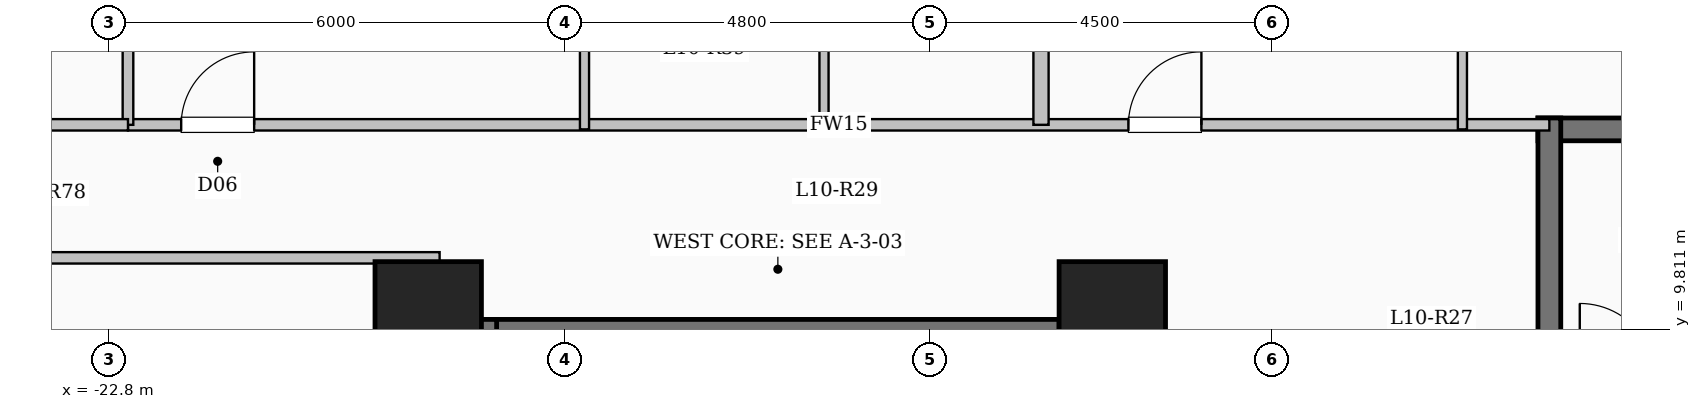
"""IFC4 building model, lengths in metres.
Left out: names, types, materials, properties, quantities, classifications, styles, units other than length and angle.
Written with IfcOpenShell. Run it as: python <this file> out.ifc"""

import sys

from ifc_helpers import new_model, si_unit, direction, frame, frame_2d, origin, origin_2d, place, context, subcontext, project, spatial, rectangle, extrude, element, fill, save


model = new_model("IFC4")
c1 = context("Model", 3, precision=1e-05, world=origin(), true_north=direction((0.0, 1.0)))
c2 = subcontext(c1, "Body", "Model", "MODEL_VIEW")
j1 = project(units=[si_unit("LENGTHUNIT", "METRE"), si_unit("PLANEANGLEUNIT", "RADIAN")], contexts=[c1])
p1 = place(None, origin())
s1 = spatial("IfcSite", under=j1, at=p1, CompositionType="ELEMENT")
p2 = place(p1, origin())
s2 = spatial("IfcBuilding", under=s1, at=p2, CompositionType="ELEMENT")
p3 = place(p2, frame((0.0, 0.0, 40.75)))
s3 = spatial("IfcBuildingStorey", under=s2, at=p3, CompositionType="ELEMENT", Elevation=40.75)
for number, where, z_axis, x_axis in (
    (1, (-9.6, 10.0, 0.0), (0.0, 0.0, 1.0), (1.0, 0.0, 0.0)),
    (2, (-18.6, 10.0, 0.0), (0.0, 0.0, 1.0), (1.0, 0.0, 0.0)),
):
    element("IfcColumn", number, at=place(p3, frame(where, z_axis=z_axis, x_axis=x_axis)), inside=s3, PredefinedType="COLUMN", context=c2, shape_type="SweptSolid", body=[
        extrude(rectangle(XDim=1.4, YDim=1.4, at=origin_2d()), origin(), (0.0, 0.0, 1.0), 3.35),
    ])
p4 = place(p3, frame((-18.0, 9.79, 0.0), z_axis=(0.0, 0.0, 1.0), x_axis=(1.0, 0.0, 0.0)))
e3 = element("IfcWall", 3, at=p4, inside=s3, PredefinedType="SHEAR", context=c2, shape_type="SweptSolid", body=[
    extrude(rectangle(XDim=8.0, YDim=0.3, at=frame_2d((4.0, 0.0))), origin(), (0.0, 0.0, 1.0), 3.35),
])
for number, where, z_axis, x_axis in (
    (4, (-17.85, 6.35, 0.0), (0.0, 0.0, 1.0), (0.0, 1.0, 0.0)),
    (5, (-10.15, 6.35, 0.0), (0.0, 0.0, 1.0), (0.0, 1.0, 0.0)),
):
    element("IfcWall", number, at=place(p3, frame(where, z_axis=z_axis, x_axis=x_axis)), inside=s3, PredefinedType="SHEAR", context=c2, shape_type="SweptSolid", body=[
        extrude(rectangle(XDim=3.59, YDim=0.3, at=frame_2d((1.795, 0.0))), origin(), (0.0, 0.0, 1.0), 3.35),
    ])
p5 = place(p3, frame((-4.0, 12.44, 0.0), z_axis=(0.0, 0.0, 1.0), x_axis=(1.0, 0.0, 0.0)))
e6 = element("IfcWall", 6, at=p5, inside=s3, PredefinedType="SHEAR", context=c2, shape_type="SweptSolid", body=[
    extrude(rectangle(XDim=8.0, YDim=0.3, at=frame_2d((4.0, 0.0))), origin(), (0.0, 0.0, 1.0), 3.35),
])
p6 = place(p3, frame((-3.85, 9.0, 0.0), z_axis=(0.0, 0.0, 1.0), x_axis=(0.0, 1.0, 0.0)))
e7 = element("IfcWall", 7, at=p6, inside=s3, PredefinedType="SHEAR", context=c2, shape_type="SweptSolid", body=[
    extrude(rectangle(XDim=3.59, YDim=0.3, at=frame_2d((1.795, 0.0))), origin(), (0.0, 0.0, 1.0), 3.35),
])
p7 = place(p3, frame((-22.55, 12.5, 0.0), z_axis=(0.0, 0.0, 1.0), x_axis=(1.0, 0.0, 0.0)))
e8 = element("IfcWall", 8, at=p7, inside=s3, PredefinedType="PARTITIONING", context=c2, shape_type="SweptSolid", body=[
    extrude(rectangle(XDim=18.7, YDim=0.15, at=frame_2d((9.35, 0.0))), origin(), (0.0, 0.0, 1.0), 3.1),
])
p8 = place(p7, frame((0.7, 0.0, 0.0)))
e9 = element("IfcOpeningElement", 9, at=p8, cuts=e8, PredefinedType="OPENING", context=c2, shape_type="SweptSolid", body=[
    extrude(rectangle(XDim=0.96, YDim=2.15, at=frame_2d((0.48, 1.075))), frame((0.0, 0.085, 0.0), z_axis=(0.0, -1.0, 0.0), x_axis=(1.0, 0.0, 0.0)), (0.0, 0.0, 1.0), 0.17),
])
p9 = place(p7, frame((13.162, 0.0, 0.0)))
e10 = element("IfcOpeningElement", 10, at=p9, cuts=e8, PredefinedType="OPENING", context=c2, shape_type="SweptSolid", body=[
    extrude(rectangle(XDim=0.96, YDim=2.15, at=frame_2d((0.48, 1.075))), frame((0.0, 0.085, 0.0), z_axis=(0.0, -1.0, 0.0), x_axis=(1.0, 0.0, 0.0)), (0.0, 0.0, 1.0), 0.17),
])
p10 = place(p3, frame((-10.538, 12.5, 0.0), z_axis=(0.0, 0.0, 1.0), x_axis=(0.0, 1.0, 0.0)))
e11 = element("IfcWall", 11, at=p10, inside=s3, PredefinedType="SOLIDWALL", context=c2, shape_type="SweptSolid", body=[
    extrude(rectangle(XDim=11.214, YDim=0.2, at=frame_2d((5.607, 0.0))), origin(), (0.0, 0.0, 1.0), 3.1),
])
p11 = place(p3, frame((-16.544, 12.44, 0.0), z_axis=(0.0, 0.0, 1.0), x_axis=(0.0, 1.0, 0.0)))
e12 = element("IfcWall", 12, at=p11, inside=s3, PredefinedType="PARTITIONING", context=c2, shape_type="SweptSolid", body=[
    extrude(rectangle(XDim=11.16, YDim=0.12, at=frame_2d((5.58, 0.0))), origin(), (0.0, 0.0, 1.0), 3.1),
])
p12 = place(p11, frame((2.905, 0.0, 0.0)))
e13 = element("IfcOpeningElement", 13, at=p12, cuts=e12, PredefinedType="OPENING", context=c2, shape_type="SweptSolid", body=[
    extrude(rectangle(XDim=1.08, YDim=2.15, at=frame_2d((0.54, 1.075))), frame((0.0, 0.07, 0.0), z_axis=(0.0, -1.0, 0.0), x_axis=(1.0, 0.0, 0.0)), (0.0, 0.0, 1.0), 0.14),
])
p13 = place(p3, frame((-13.393, 12.44, 0.0), z_axis=(0.0, 0.0, 1.0), x_axis=(0.0, 1.0, 0.0)))
e14 = element("IfcWall", 14, at=p13, inside=s3, PredefinedType="PARTITIONING", context=c2, shape_type="SweptSolid", body=[
    extrude(rectangle(XDim=2.62, YDim=0.12, at=frame_2d((1.31, 0.0))), origin(), (0.0, 0.0, 1.0), 3.1),
])
p14 = place(p3, frame((-4.994, 12.44, 0.0), z_axis=(0.0, 0.0, 1.0), x_axis=(0.0, 1.0, 0.0)))
e15 = element("IfcWall", 15, at=p14, inside=s3, PredefinedType="PARTITIONING", context=c2, shape_type="SweptSolid", body=[
    extrude(rectangle(XDim=12.64, YDim=0.12, at=frame_2d((6.32, 0.0))), origin(), (0.0, 0.0, 1.0), 3.1),
])
p15 = place(p14, frame((3.075, 0.0, 0.0)))
e16 = element("IfcOpeningElement", 16, at=p15, cuts=e15, PredefinedType="OPENING", context=c2, shape_type="SweptSolid", body=[
    extrude(rectangle(XDim=1.08, YDim=2.15, at=frame_2d((0.54, 1.075))), frame((0.0, 0.07, 0.0), z_axis=(0.0, -1.0, 0.0), x_axis=(1.0, 0.0, 0.0)), (0.0, 0.0, 1.0), 0.14),
])
p16 = place(p3, frame((-28.68, 10.75, 0.0), z_axis=(0.0, 0.0, 1.0), x_axis=(1.0, 0.0, 0.0)))
e17 = element("IfcWall", 17, at=p16, inside=s3, PredefinedType="PARTITIONING", context=c2, shape_type="SweptSolid", body=[
    extrude(rectangle(XDim=10.23, YDim=0.15, at=frame_2d((5.115, 0.0))), origin(), (0.0, 0.0, 1.0), 3.1),
])
p17 = place(p3, frame((-22.55, 12.5, 0.0), z_axis=(0.0, 0.0, 1.0), x_axis=(0.0, 1.0, 0.0)))
e18 = element("IfcWall", 18, at=p17, inside=s3, PredefinedType="PARTITIONING", context=c2, shape_type="SweptSolid", body=[
    extrude(rectangle(XDim=6.55, YDim=0.14, at=frame_2d((3.275, 0.0))), origin(), (0.0, 0.0, 1.0), 3.1),
])
p18 = place(p3, frame((-28.68, 12.5, 0.0), z_axis=(0.0, 0.0, 1.0), x_axis=(1.0, 0.0, 0.0)))
e19 = element("IfcWall", 19, at=p18, inside=s3, PredefinedType="PARTITIONING", context=c2, shape_type="SweptSolid", body=[
    extrude(rectangle(XDim=6.13, YDim=0.15, at=frame_2d((3.065, 0.0))), origin(), (0.0, 0.0, 1.0), 3.1),
])
p19 = place(p18, frame((2.59, 0.0, 0.0)))
e20 = element("IfcOpeningElement", 20, at=p19, cuts=e19, PredefinedType="OPENING", context=c2, shape_type="SweptSolid", body=[
    extrude(rectangle(XDim=0.95, YDim=2.15, at=frame_2d((0.475, 1.075))), frame((0.0, 0.085, 0.0), z_axis=(0.0, -1.0, 0.0), x_axis=(1.0, 0.0, 0.0)), (0.0, 0.0, 1.0), 0.17),
])
p20 = place(p8, origin())
e21 = element("IfcDoor", 21, at=p20, inside=s3, OperationType="SINGLE_SWING_RIGHT", PredefinedType="DOOR", context=c2, shape_type="SweptSolid", body=[
    extrude(rectangle(XDim=0.96, YDim=2.15, at=frame_2d((0.48, 1.075))), frame((0.0, 0.025, 0.0), z_axis=(0.0, -1.0, 0.0), x_axis=(1.0, 0.0, 0.0)), (0.0, 0.0, 1.0), 0.05),
])
fill(e9, e21)
p21 = place(p9, origin())
e22 = element("IfcDoor", 22, at=p21, inside=s3, OperationType="SINGLE_SWING_RIGHT", PredefinedType="DOOR", context=c2, shape_type="SweptSolid", body=[
    extrude(rectangle(XDim=0.96, YDim=2.15, at=frame_2d((0.48, 1.075))), frame((0.0, 0.025, 0.0), z_axis=(0.0, -1.0, 0.0), x_axis=(1.0, 0.0, 0.0)), (0.0, 0.0, 1.0), 0.05),
])
fill(e10, e22)
save(model, sys.argv[1])
